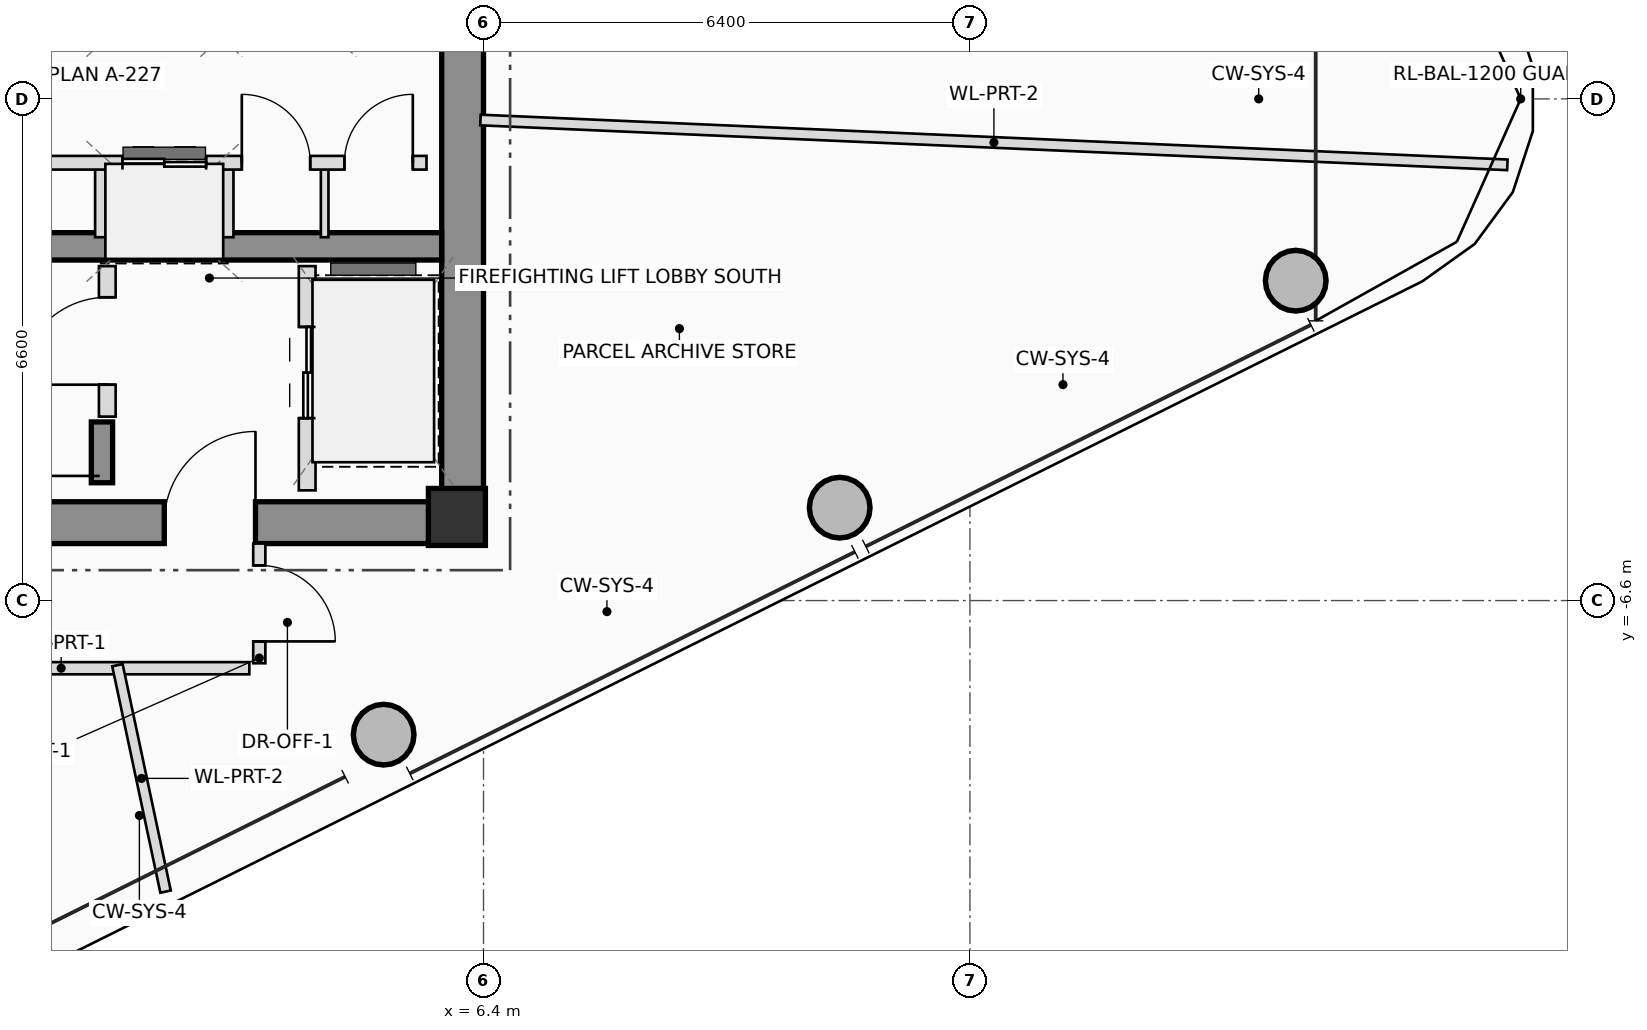
"""IFC4 building model, lengths in metres.
Left out: names, types, materials, properties, quantities, classifications, styles, units other than length and angle.
Written with IfcOpenShell. Run it as: python <this file> out.ifc"""

import sys

from ifc_helpers import new_model, si_unit, direction, frame, frame_2d, origin, origin_2d, place, context, subcontext, project, spatial, rectangle, hollow_circle, extrude, source, transform, mapped, element, fill, save


model = new_model("IFC4")
c1 = context("Model", 3, precision=1e-05, world=origin(), true_north=direction((0.0, 1.0)))
c2 = subcontext(c1, "Body", "Model", "MODEL_VIEW")
j1 = project(units=[si_unit("LENGTHUNIT", "METRE"), si_unit("PLANEANGLEUNIT", "RADIAN")], contexts=[c1])
p1 = place(None, origin())
s1 = spatial("IfcSite", under=j1, at=p1, CompositionType="ELEMENT")
p2 = place(p1, origin())
s2 = spatial("IfcBuilding", under=s1, at=p2, CompositionType="ELEMENT")
p3 = place(p2, frame((0.0, 0.0, 296.75)))
s3 = spatial("IfcBuildingStorey", under=s2, at=p3, CompositionType="ELEMENT", Elevation=296.75)
m1 = source(origin(), c2, "Body", "SweptSolid", [
    extrude(rectangle(XDim=0.75, YDim=0.75, at=origin_2d()), origin(), (0.0, 0.0, 1.0), 3.45),
])
p4 = place(p3, frame((6.05, -5.5, 0.0), z_axis=(0.0, 0.0, 1.0), x_axis=(1.0, 0.0, 0.0)))
e1 = element("IfcColumn", 1, at=p4, inside=s3, PredefinedType="COLUMN", context=c2, shape_type="MappedRepresentation", body=[
    mapped(m1, transform((0.0, 0.0, 0.0), scale=1.0)),
])
p5 = place(p3, frame((-6.4, -5.575, 0.0), z_axis=(0.0, 0.0, 1.0), x_axis=(1.0, 0.0, 0.0)))
e2 = element("IfcWall", 2, at=p5, inside=s3, PredefinedType="SHEAR", context=c2, shape_type="SweptSolid", body=[
    extrude(rectangle(XDim=12.8, YDim=0.55, at=frame_2d((6.4, 0.0))), origin(), (0.0, 0.0, 1.0), 3.45),
])
p6 = place(p5, frame((8.6, 0.0, 0.0)))
e3 = element("IfcOpeningElement", 3, at=p6, cuts=e2, PredefinedType="OPENING", context=c2, shape_type="SweptSolid", body=[
    extrude(rectangle(XDim=1.2, YDim=2.2, at=frame_2d((0.6, 1.1))), frame((0.0, 0.285, 0.0), z_axis=(0.0, -1.0, 0.0), x_axis=(1.0, 0.0, 0.0)), (0.0, 0.0, 1.0), 0.57),
])
p7 = place(p3, frame((6.125, -5.3, 0.0), z_axis=(0.0, 0.0, 1.0), x_axis=(0.0, 1.0, 0.0)))
e4 = element("IfcWall", 4, at=p7, inside=s3, PredefinedType="SHEAR", context=c2, shape_type="SweptSolid", body=[
    extrude(rectangle(XDim=10.6, YDim=0.55, at=frame_2d((5.3, 0.0))), origin(), (0.0, 0.0, 1.0), 3.45),
])
p8 = place(p3, frame((-5.85, -1.94, 0.0), z_axis=(0.0, 0.0, 1.0), x_axis=(1.0, 0.0, 0.0)))
e5 = element("IfcWall", 5, at=p8, inside=s3, PredefinedType="SHEAR", context=c2, shape_type="SweptSolid", body=[
    extrude(rectangle(XDim=11.7, YDim=0.36, at=frame_2d((5.85, 0.0))), origin(), (0.0, 0.0, 1.0), 3.45),
])
p9 = place(p3, frame((1.38, -5.05, 0.0), z_axis=(0.0, 0.0, 1.0), x_axis=(0.0, 1.0, 0.0)))
e6 = element("IfcWall", 6, at=p9, inside=s3, PredefinedType="SHEAR", context=c2, shape_type="SweptSolid", body=[
    extrude(rectangle(XDim=0.8, YDim=0.28, at=frame_2d((0.4, 0.0))), origin(), (0.0, 0.0, 1.0), 3.45),
])
m2 = source(origin(), c2, "Body", "SweptSolid", [
    extrude(hollow_circle(Radius=0.4, WallThickness=0.028, at=origin_2d()), origin(), (0.0, 0.0, 1.0), 3.45),
])
for number, where, z_axis, x_axis in (
    (7, (5.086, -8.364, 0.0), (0.0, 0.0, 1.0), (1.0, 0.0, 0.0)),
    (8, (11.086, -5.378, 0.0), (0.0, 0.0, 1.0), (1.0, 0.0, 0.0)),
    (9, (17.087, -2.392, 0.0), (0.0, 0.0, 1.0), (1.0, 0.0, 0.0)),
):
    element("IfcColumn", number, at=place(p3, frame(where, z_axis=z_axis, x_axis=x_axis)), inside=s3, PredefinedType="COLUMN", context=c2, shape_type="MappedRepresentation", body=[
        mapped(m2, transform((0.0, 0.0, 0.0), scale=1.0)),
    ])
p10 = place(p3, frame((1.45, -4.18, 0.0), z_axis=(0.0, 0.0, 1.0), x_axis=(0.0, 1.0, 0.0)))
e10 = element("IfcWall", 10, at=p10, inside=s3, PredefinedType="PLUMBINGWALL", context=c2, shape_type="SweptSolid", body=[
    extrude(rectangle(XDim=1.98, YDim=0.22, at=frame_2d((0.99, 0.0))), origin(), (0.0, 0.0, 1.0), 3.25),
])
p11 = place(p10, frame((0.42, 0.0, 0.0)))
e11 = element("IfcOpeningElement", 11, at=p11, cuts=e10, PredefinedType="OPENING", context=c2, shape_type="SweptSolid", body=[
    extrude(rectangle(XDim=1.15, YDim=2.15, at=frame_2d((0.575, 1.075))), frame((0.0, 0.12, 0.0), z_axis=(0.0, -1.0, 0.0), x_axis=(1.0, 0.0, 0.0)), (0.0, 0.0, 1.0), 0.24),
])
p12 = place(p3, frame((4.08, -5.15, 0.0), z_axis=(0.0, 0.0, 1.0), x_axis=(0.0, 1.0, 0.0)))
e12 = element("IfcWall", 12, at=p12, inside=s3, PredefinedType="PLUMBINGWALL", context=c2, shape_type="SweptSolid", body=[
    extrude(rectangle(XDim=2.95, YDim=0.22, at=frame_2d((1.475, 0.0))), origin(), (0.0, 0.0, 1.0), 3.25),
])
p13 = place(p12, frame((0.95, 0.0, 0.0)))
e13 = element("IfcOpeningElement", 13, at=p13, cuts=e12, PredefinedType="OPENING", context=c2, shape_type="SweptSolid", body=[
    extrude(rectangle(XDim=1.2, YDim=2.25, at=frame_2d((0.6, 1.125))), frame((0.0, 0.12, 0.0), z_axis=(0.0, -1.0, 0.0), x_axis=(1.0, 0.0, 0.0)), (0.0, 0.0, 1.0), 0.24),
])
for number, where, z_axis, x_axis in (
    (14, (1.38, -1.82, 0.0), (0.0, 0.0, 1.0), (0.0, 1.0, 0.0)),
    (15, (3.02, -1.82, 0.0), (0.0, 0.0, 1.0), (0.0, 1.0, 0.0)),
):
    element("IfcWall", number, at=place(p3, frame(where, z_axis=z_axis, x_axis=x_axis)), inside=s3, PredefinedType="PLUMBINGWALL", context=c2, shape_type="SweptSolid", body=[
        extrude(rectangle(XDim=0.98, YDim=0.18, at=frame_2d((0.49, 0.0))), origin(), (0.0, 0.0, 1.0), 3.25),
    ])
p14 = place(p3, frame((4.31, -1.82, 0.0), z_axis=(0.0, 0.0, 1.0), x_axis=(0.0, 1.0, 0.0)))
e16 = element("IfcWall", 16, at=p14, inside=s3, PredefinedType="PARTITIONING", context=c2, shape_type="SweptSolid", body=[
    extrude(rectangle(XDim=0.98, YDim=0.1, at=frame_2d((0.49, 0.0))), origin(), (0.0, 0.0, 1.0), 3.25),
])
p15 = place(p3, frame((-5.68, -0.84, 0.0), z_axis=(0.0, 0.0, 1.0), x_axis=(1.0, 0.0, 0.0)))
e17 = element("IfcWall", 17, at=p15, inside=s3, PredefinedType="PLUMBINGWALL", context=c2, shape_type="SweptSolid", body=[
    extrude(rectangle(XDim=11.33, YDim=0.18, at=frame_2d((5.665, 0.0))), origin(), (0.0, 0.0, 1.0), 3.25),
])
p16 = place(p15, frame((1.88, 0.0, 0.0)))
e18 = element("IfcOpeningElement", 18, at=p16, cuts=e17, PredefinedType="OPENING", context=c2, shape_type="SweptSolid", body=[
    extrude(rectangle(XDim=0.9, YDim=2.05, at=frame_2d((0.45, 1.025))), frame((0.0, 0.1, 0.0), z_axis=(0.0, -1.0, 0.0), x_axis=(1.0, 0.0, 0.0)), (0.0, 0.0, 1.0), 0.2),
])
p17 = place(p15, frame((5.35, 0.0, 0.0)))
e19 = element("IfcOpeningElement", 19, at=p17, cuts=e17, PredefinedType="OPENING", context=c2, shape_type="SweptSolid", body=[
    extrude(rectangle(XDim=0.9, YDim=2.05, at=frame_2d((0.45, 1.025))), frame((0.0, 0.1, 0.0), z_axis=(0.0, -1.0, 0.0), x_axis=(1.0, 0.0, 0.0)), (0.0, 0.0, 1.0), 0.2),
])
p18 = place(p15, frame((7.33, 0.0, 0.0)))
e20 = element("IfcOpeningElement", 20, at=p18, cuts=e17, PredefinedType="OPENING", context=c2, shape_type="SweptSolid", body=[
    extrude(rectangle(XDim=1.1, YDim=2.2, at=frame_2d((0.55, 1.1))), frame((0.0, 0.1, 0.0), z_axis=(0.0, -1.0, 0.0), x_axis=(1.0, 0.0, 0.0)), (0.0, 0.0, 1.0), 0.2),
])
p19 = place(p15, frame((8.9, 0.0, 0.0)))
e21 = element("IfcOpeningElement", 21, at=p19, cuts=e17, PredefinedType="OPENING", context=c2, shape_type="SweptSolid", body=[
    extrude(rectangle(XDim=0.9, YDim=2.05, at=frame_2d((0.45, 1.025))), frame((0.0, 0.1, 0.0), z_axis=(0.0, -1.0, 0.0), x_axis=(1.0, 0.0, 0.0)), (0.0, 0.0, 1.0), 0.2),
])
p20 = place(p15, frame((10.25, 0.0, 0.0)))
e22 = element("IfcOpeningElement", 22, at=p20, cuts=e17, PredefinedType="OPENING", context=c2, shape_type="SweptSolid", body=[
    extrude(rectangle(XDim=0.9, YDim=2.05, at=frame_2d((0.45, 1.025))), frame((0.0, 0.1, 0.0), z_axis=(0.0, -1.0, 0.0), x_axis=(1.0, 0.0, 0.0)), (0.0, 0.0, 1.0), 0.2),
])
p21 = place(p3, frame((3.45, -5.85, 0.0), z_axis=(0.0, 0.0, 1.0), x_axis=(0.0, -1.0, 0.0)))
e23 = element("IfcWall", 23, at=p21, inside=s3, PredefinedType="PARTITIONING", context=c2, shape_type="SweptSolid", body=[
    extrude(rectangle(XDim=1.575, YDim=0.16, at=frame_2d((0.787, 0.0))), origin(), (0.0, 0.0, 1.0), 2.855),
])
p22 = place(p21, frame((0.287, 0.0, 0.0)))
e24 = element("IfcOpeningElement", 24, at=p22, cuts=e23, PredefinedType="OPENING", context=c2, shape_type="SweptSolid", body=[
    extrude(rectangle(XDim=1.0, YDim=2.25, at=frame_2d((0.5, 1.125))), frame((0.0, 0.09, 0.0), z_axis=(0.0, -1.0, 0.0), x_axis=(1.0, 0.0, 0.0)), (0.0, 0.0, 1.0), 0.18),
])
p23 = place(p3, frame((3.319, -7.49, 0.0), z_axis=(0.0, 0.0, 1.0), x_axis=(-1.0, 0.0, 0.0)))
e25 = element("IfcWall", 25, at=p23, inside=s3, PredefinedType="PARTITIONING", context=c2, shape_type="SweptSolid", body=[
    extrude(rectangle(XDim=9.679, YDim=0.16, at=frame_2d((4.84, 0.0))), origin(), (0.0, 0.0, 1.0), 2.655),
])
p24 = place(p23, frame((5.101, 0.0, 0.0)))
e26 = element("IfcOpeningElement", 26, at=p24, cuts=e25, PredefinedType="OPENING", context=c2, shape_type="SweptSolid", body=[
    extrude(rectangle(XDim=1.0, YDim=2.25, at=frame_2d((0.5, 1.125))), frame((0.0, 0.09, 0.0), z_axis=(0.0, -1.0, 0.0), x_axis=(1.0, 0.0, 0.0)), (0.0, 0.0, 1.0), 0.18),
])
p25 = place(p3, frame((6.36, -0.278, 0.0), z_axis=(0.0, 0.0, 1.0), x_axis=(0.999047623791, -0.043633076864, 0.0)))
e27 = element("IfcWall", 27, at=p25, inside=s3, PredefinedType="PARTITIONING", context=c2, shape_type="SweptSolid", body=[
    extrude(rectangle(XDim=13.524, YDim=0.14, at=frame_2d((6.762, 0.0))), origin(), (0.0, 0.0, 1.0), 2.815),
])
p26 = place(p3, frame((1.583, -7.45, 0.0), z_axis=(0.0, 0.0, 1.0), x_axis=(0.207941206443, -0.978141326529, 0.0)))
e28 = element("IfcWall", 28, at=p26, inside=s3, PredefinedType="PARTITIONING", context=c2, shape_type="SweptSolid", body=[
    extrude(rectangle(XDim=3.046, YDim=0.14, at=frame_2d((1.523, 0.0))), origin(), (0.0, 0.0, 1.0), 2.815),
])
p27 = place(p6, origin())
e29 = element("IfcDoor", 29, at=p27, inside=s3, OperationType="SINGLE_SWING_RIGHT", PredefinedType="DOOR", context=c2, shape_type="SweptSolid", body=[
    extrude(rectangle(XDim=1.2, YDim=2.2, at=frame_2d((0.6, 1.1))), frame((0.0, 0.025, 0.0), z_axis=(0.0, -1.0, 0.0), x_axis=(1.0, 0.0, 0.0)), (0.0, 0.0, 1.0), 0.05),
])
fill(e3, e29)
p28 = place(p11, origin())
e30 = element("IfcDoor", 30, at=p28, inside=s3, OperationType="SINGLE_SWING_LEFT", PredefinedType="DOOR", context=c2, shape_type="SweptSolid", body=[
    extrude(rectangle(XDim=1.15, YDim=2.15, at=frame_2d((0.575, 1.075))), frame((0.0, 0.025, 0.0), z_axis=(0.0, -1.0, 0.0), x_axis=(1.0, 0.0, 0.0)), (0.0, 0.0, 1.0), 0.05),
])
fill(e11, e30)
p29 = place(p13, origin())
e31 = element("IfcDoor", 31, at=p29, inside=s3, OperationType="DOUBLE_DOOR_SLIDING", PredefinedType="DOOR", context=c2, shape_type="SweptSolid", body=[
    extrude(rectangle(XDim=1.2, YDim=2.25, at=frame_2d((0.6, 1.125))), frame((0.0, 0.025, 0.0), z_axis=(0.0, -1.0, 0.0), x_axis=(1.0, 0.0, 0.0)), (0.0, 0.0, 1.0), 0.05),
])
fill(e13, e31)
p30 = place(p18, origin())
e32 = element("IfcDoor", 32, at=p30, inside=s3, OperationType="DOUBLE_DOOR_SLIDING", PredefinedType="DOOR", context=c2, shape_type="SweptSolid", body=[
    extrude(rectangle(XDim=1.1, YDim=2.2, at=frame_2d((0.55, 1.1))), frame((0.0, 0.025, 0.0), z_axis=(0.0, -1.0, 0.0), x_axis=(1.0, 0.0, 0.0)), (0.0, 0.0, 1.0), 0.05),
])
fill(e20, e32)
p31 = place(p19, origin())
e33 = element("IfcDoor", 33, at=p31, inside=s3, OperationType="SINGLE_SWING_LEFT", PredefinedType="DOOR", context=c2, shape_type="SweptSolid", body=[
    extrude(rectangle(XDim=0.9, YDim=2.05, at=frame_2d((0.45, 1.025))), frame((0.0, 0.025, 0.0), z_axis=(0.0, -1.0, 0.0), x_axis=(1.0, 0.0, 0.0)), (0.0, 0.0, 1.0), 0.05),
])
fill(e21, e33)
p32 = place(p20, origin())
e34 = element("IfcDoor", 34, at=p32, inside=s3, OperationType="SINGLE_SWING_RIGHT", PredefinedType="DOOR", context=c2, shape_type="SweptSolid", body=[
    extrude(rectangle(XDim=0.9, YDim=2.05, at=frame_2d((0.45, 1.025))), frame((0.0, 0.025, 0.0), z_axis=(0.0, -1.0, 0.0), x_axis=(1.0, 0.0, 0.0)), (0.0, 0.0, 1.0), 0.05),
])
fill(e22, e34)
p33 = place(p22, origin())
e35 = element("IfcDoor", 35, at=p33, inside=s3, OperationType="SINGLE_SWING_RIGHT", PredefinedType="DOOR", context=c2, shape_type="SweptSolid", body=[
    extrude(rectangle(XDim=1.0, YDim=2.25, at=frame_2d((0.5, 1.125))), frame((0.0, 0.025, 0.0), z_axis=(0.0, -1.0, 0.0), x_axis=(1.0, 0.0, 0.0)), (0.0, 0.0, 1.0), 0.05),
])
fill(e24, e35)
save(model, sys.argv[1])
